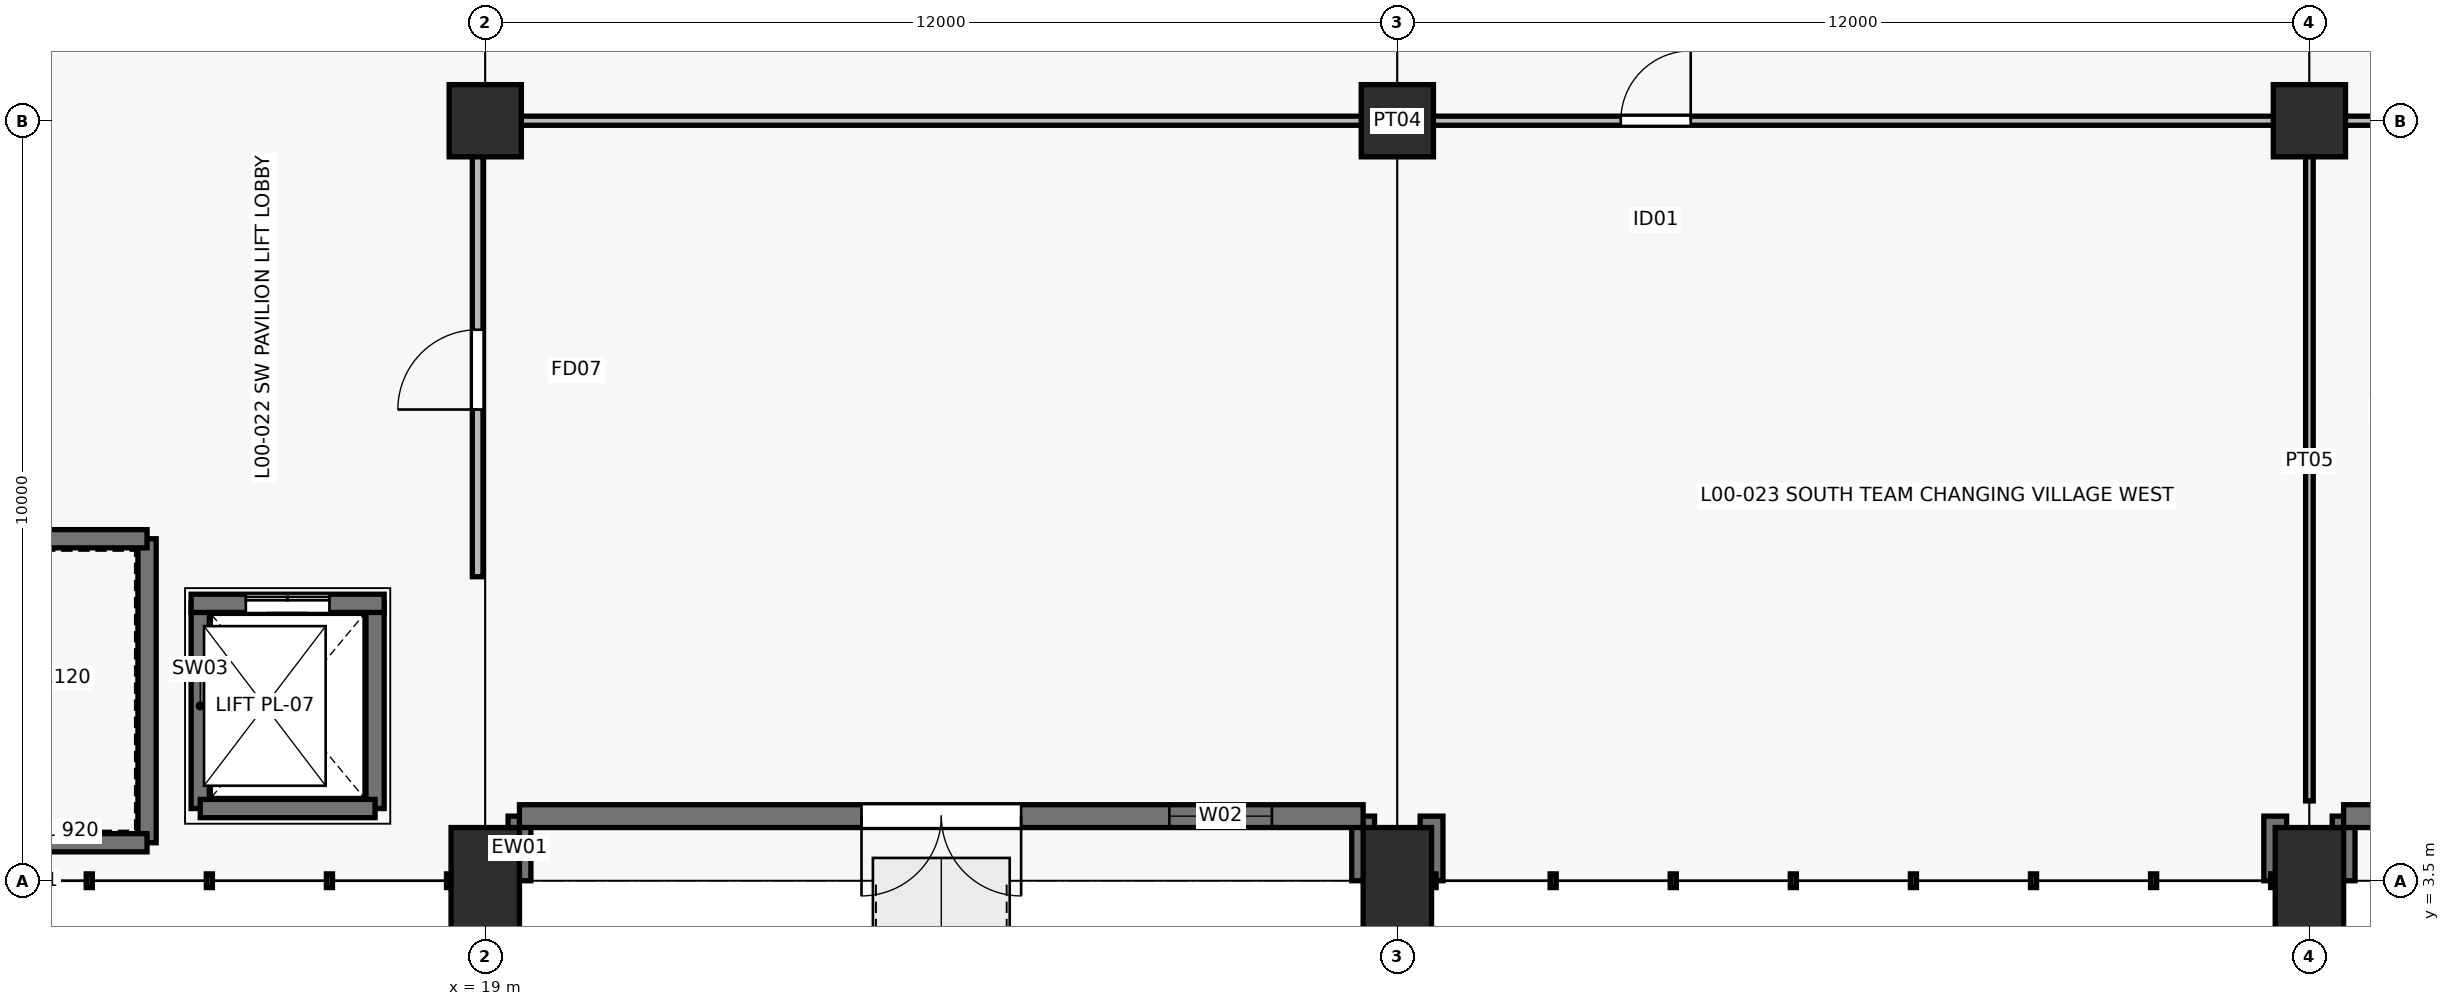
"""IFC4 building model, lengths in metres.
Left out: names, types, materials, properties, quantities, classifications, styles, units other than length and angle.
Written with IfcOpenShell. Run it as: python <this file> out.ifc"""

import sys

from ifc_helpers import new_model, si_unit, direction, frame, frame_2d, origin, origin_2d, place, context, subcontext, project, spatial, rectangle, extrude, element, fill, save


model = new_model("IFC4")
c1 = context("Model", 3, precision=1e-05, world=origin(), true_north=direction((0.0, 1.0)))
c2 = subcontext(c1, "Body", "Model", "MODEL_VIEW")
j1 = project(units=[si_unit("LENGTHUNIT", "METRE"), si_unit("PLANEANGLEUNIT", "RADIAN")], contexts=[c1])
p1 = place(None, origin())
s1 = spatial("IfcSite", under=j1, at=p1, CompositionType="ELEMENT")
p2 = place(p1, origin())
s2 = spatial("IfcBuilding", under=s1, at=p2, CompositionType="ELEMENT")
p3 = place(p2, origin())
s3 = spatial("IfcBuildingStorey", under=s2, at=p3, CompositionType="ELEMENT", Elevation=0.0)
p4 = place(p3, frame((19.0, 3.5, 0.0), z_axis=(0.0, 0.0, 1.0), x_axis=(1.0, 0.0, 0.0)))
e1 = element("IfcColumn", 1, at=p4, inside=s3, PredefinedType="PILASTER", context=c2, shape_type="SweptSolid", body=[
    extrude(rectangle(XDim=0.9, YDim=1.4, at=origin_2d()), origin(), (0.0, 0.0, 1.0), 4.8),
])
p5 = place(p3, frame((19.0, 13.5, 0.0), z_axis=(0.0, 0.0, 1.0), x_axis=(1.0, 0.0, 0.0)))
e2 = element("IfcColumn", 2, at=p5, inside=s3, PredefinedType="COLUMN", context=c2, shape_type="SweptSolid", body=[
    extrude(rectangle(XDim=0.95, YDim=0.95, at=origin_2d()), origin(), (0.0, 0.0, 1.0), 4.8),
])
p6 = place(p3, frame((31.0, 3.5, 0.0), z_axis=(0.0, 0.0, 1.0), x_axis=(1.0, 0.0, 0.0)))
e3 = element("IfcColumn", 3, at=p6, inside=s3, PredefinedType="PILASTER", context=c2, shape_type="SweptSolid", body=[
    extrude(rectangle(XDim=0.9, YDim=1.4, at=origin_2d()), origin(), (0.0, 0.0, 1.0), 4.8),
])
p7 = place(p3, frame((31.0, 13.5, 0.0), z_axis=(0.0, 0.0, 1.0), x_axis=(1.0, 0.0, 0.0)))
e4 = element("IfcColumn", 4, at=p7, inside=s3, PredefinedType="COLUMN", context=c2, shape_type="SweptSolid", body=[
    extrude(rectangle(XDim=0.95, YDim=0.95, at=origin_2d()), origin(), (0.0, 0.0, 1.0), 4.8),
])
p8 = place(p3, frame((43.0, 3.5, 0.0), z_axis=(0.0, 0.0, 1.0), x_axis=(1.0, 0.0, 0.0)))
e5 = element("IfcColumn", 5, at=p8, inside=s3, PredefinedType="PILASTER", context=c2, shape_type="SweptSolid", body=[
    extrude(rectangle(XDim=0.9, YDim=1.4, at=origin_2d()), origin(), (0.0, 0.0, 1.0), 4.8),
])
p9 = place(p3, frame((43.0, 13.5, 0.0), z_axis=(0.0, 0.0, 1.0), x_axis=(1.0, 0.0, 0.0)))
e6 = element("IfcColumn", 6, at=p9, inside=s3, PredefinedType="COLUMN", context=c2, shape_type="SweptSolid", body=[
    extrude(rectangle(XDim=0.95, YDim=0.95, at=origin_2d()), origin(), (0.0, 0.0, 1.0), 4.8),
])
for number, where, z_axis, x_axis in (
    (7, (19.45, 3.5, 0.0), (0.0, 0.0, 1.0), (0.0, 1.0, 0.0)),
    (8, (30.55, 4.35, 0.0), (0.0, 0.0, 1.0), (0.0, -1.0, 0.0)),
):
    element("IfcWall", number, at=place(p3, frame(where, z_axis=z_axis, x_axis=x_axis)), inside=s3, PredefinedType="SOLIDWALL", context=c2, shape_type="SweptSolid", body=[
        extrude(rectangle(XDim=0.85, YDim=0.3, at=frame_2d((0.425, 0.0))), origin(), (0.0, 0.0, 1.0), 4.8),
    ])
p10 = place(p3, frame((30.55, 4.35, 0.0), z_axis=(0.0, 0.0, 1.0), x_axis=(-1.0, 0.0, 0.0)))
e9 = element("IfcWall", 9, at=p10, inside=s3, PredefinedType="SOLIDWALL", context=c2, shape_type="SweptSolid", body=[
    extrude(rectangle(XDim=11.1, YDim=0.3, at=frame_2d((5.55, 0.0))), origin(), (0.0, 0.0, 1.0), 4.8),
])
p11 = place(p10, frame((4.5, 0.0, 0.0)))
e10 = element("IfcOpeningElement", 10, at=p11, cuts=e9, PredefinedType="OPENING", context=c2, shape_type="SweptSolid", body=[
    extrude(rectangle(XDim=2.1, YDim=2.35, at=frame_2d((1.05, 1.175))), frame((0.0, 0.16, 0.0), z_axis=(0.0, -1.0, 0.0), x_axis=(1.0, 0.0, 0.0)), (0.0, 0.0, 1.0), 0.32),
])
p12 = place(p10, frame((1.2, 0.0, 1.0)))
e11 = element("IfcOpeningElement", 11, at=p12, cuts=e9, PredefinedType="OPENING", context=c2, shape_type="SweptSolid", body=[
    extrude(rectangle(XDim=1.35, YDim=1.5, at=frame_2d((0.675, 0.75))), frame((0.0, 0.16, 0.0), z_axis=(0.0, -1.0, 0.0), x_axis=(1.0, 0.0, 0.0)), (0.0, 0.0, 1.0), 0.32),
])
for number, where, z_axis, x_axis in (
    (12, (31.45, 3.5, 0.0), (0.0, 0.0, 1.0), (0.0, 1.0, 0.0)),
    (13, (42.55, 4.35, 0.0), (0.0, 0.0, 1.0), (0.0, -1.0, 0.0)),
    (14, (43.45, 3.5, 0.0), (0.0, 0.0, 1.0), (0.0, 1.0, 0.0)),
):
    element("IfcWall", number, at=place(p3, frame(where, z_axis=z_axis, x_axis=x_axis)), inside=s3, PredefinedType="SOLIDWALL", context=c2, shape_type="SweptSolid", body=[
        extrude(rectangle(XDim=0.85, YDim=0.3, at=frame_2d((0.425, 0.0))), origin(), (0.0, 0.0, 1.0), 4.8),
    ])
p13 = place(p3, frame((54.55, 4.35, 0.0), z_axis=(0.0, 0.0, 1.0), x_axis=(-1.0, 0.0, 0.0)))
e15 = element("IfcWall", 15, at=p13, inside=s3, PredefinedType="SOLIDWALL", context=c2, shape_type="SweptSolid", body=[
    extrude(rectangle(XDim=11.1, YDim=0.3, at=frame_2d((5.55, 0.0))), origin(), (0.0, 0.0, 1.0), 4.8),
])
p14 = place(p13, frame((1.8, 0.0, 0.0)))
e16 = element("IfcOpeningElement", 16, at=p14, cuts=e15, PredefinedType="OPENING", context=c2, shape_type="SweptSolid", body=[
    extrude(rectangle(XDim=2.8, YDim=2.7, at=frame_2d((1.4, 1.35))), frame((0.0, 0.16, 0.0), z_axis=(0.0, -1.0, 0.0), x_axis=(1.0, 0.0, 0.0)), (0.0, 0.0, 1.0), 0.32),
])
p15 = place(p3, frame((15.25, 4.45, -1.3), z_axis=(0.0, 0.0, 1.0), x_axis=(0.0, 1.0, 0.0)))
e17 = element("IfcWall", 17, at=p15, inside=s3, PredefinedType="SHEAR", context=c2, shape_type="SweptSolid", body=[
    extrude(rectangle(XDim=2.7, YDim=0.24, at=frame_2d((1.35, 0.0))), origin(), (0.0, 0.0, 1.0), 6.1),
])
p16 = place(p3, frame((17.55, 7.15, 0.0), z_axis=(0.0, 0.0, 1.0), x_axis=(0.0, -1.0, 0.0)))
e18 = element("IfcWall", 18, at=p16, inside=s3, PredefinedType="SHEAR", context=c2, shape_type="SweptSolid", body=[
    extrude(rectangle(XDim=2.7, YDim=0.24, at=frame_2d((1.35, 0.0))), origin(), (0.0, 0.0, 1.0), 4.8),
])
p17 = place(p3, frame((17.55, 4.45, 0.0), z_axis=(0.0, 0.0, 1.0), x_axis=(-1.0, 0.0, 0.0)))
e19 = element("IfcWall", 19, at=p17, inside=s3, PredefinedType="SHEAR", context=c2, shape_type="SweptSolid", body=[
    extrude(rectangle(XDim=2.3, YDim=0.24, at=frame_2d((1.15, 0.0))), origin(), (0.0, 0.0, 1.0), 4.8),
])
p18 = place(p3, frame((15.13, 7.15, 0.0), z_axis=(0.0, 0.0, 1.0), x_axis=(1.0, 0.0, 0.0)))
e20 = element("IfcWall", 20, at=p18, inside=s3, PredefinedType="SHEAR", context=c2, shape_type="SweptSolid", body=[
    extrude(rectangle(XDim=2.54, YDim=0.24, at=frame_2d((1.27, 0.0))), origin(), (0.0, 0.0, 1.0), 4.8),
])
p19 = place(p18, frame((0.72, 0.0, 0.0)))
e21 = element("IfcOpeningElement", 21, at=p19, cuts=e20, PredefinedType="OPENING", context=c2, shape_type="SweptSolid", body=[
    extrude(rectangle(XDim=1.1, YDim=2.15, at=frame_2d((0.55, 1.075))), frame((0.0, 0.13, 0.0), z_axis=(0.0, -1.0, 0.0), x_axis=(1.0, 0.0, 0.0)), (0.0, 0.0, 1.0), 0.26),
])
p20 = place(p3, frame((14.55, 4.0, 0.0), z_axis=(0.0, 0.0, 1.0), x_axis=(0.0, 1.0, 0.0)))
e22 = element("IfcWall", 22, at=p20, inside=s3, PredefinedType="SHEAR", context=c2, shape_type="SweptSolid", body=[
    extrude(rectangle(XDim=4.0, YDim=0.24, at=frame_2d((2.0, 0.0))), origin(), (0.0, 0.0, 1.0), 4.8),
])
p21 = place(p3, frame((7.45, 4.0, 0.0), z_axis=(0.0, 0.0, 1.0), x_axis=(1.0, 0.0, 0.0)))
e23 = element("IfcWall", 23, at=p21, inside=s3, PredefinedType="SHEAR", context=c2, shape_type="SweptSolid", body=[
    extrude(rectangle(XDim=7.1, YDim=0.24, at=frame_2d((3.55, 0.0))), origin(), (0.0, 0.0, 1.0), 4.8),
])
p22 = place(p3, frame((7.45, 8.0, 0.0), z_axis=(0.0, 0.0, 1.0), x_axis=(1.0, 0.0, 0.0)))
e24 = element("IfcWall", 24, at=p22, inside=s3, PredefinedType="SHEAR", context=c2, shape_type="SweptSolid", body=[
    extrude(rectangle(XDim=7.1, YDim=0.24, at=frame_2d((3.55, 0.0))), origin(), (0.0, 0.0, 1.0), 4.8),
])
p23 = place(p22, frame((0.18, 0.0, 0.0)))
e25 = element("IfcOpeningElement", 25, at=p23, cuts=e24, PredefinedType="OPENING", context=c2, shape_type="SweptSolid", body=[
    extrude(rectangle(XDim=1.0, YDim=2.15, at=frame_2d((0.5, 1.075))), frame((0.0, 0.13, 0.0), z_axis=(0.0, -1.0, 0.0), x_axis=(1.0, 0.0, 0.0)), (0.0, 0.0, 1.0), 0.26),
])
p24 = place(p3, frame((18.9, 7.5, 0.0), z_axis=(0.0, 0.0, 1.0), x_axis=(0.0, 1.0, 0.0)))
e26 = element("IfcWall", 26, at=p24, inside=s3, PredefinedType="PARTITIONING", context=c2, shape_type="SweptSolid", body=[
    extrude(rectangle(XDim=5.9, YDim=0.14, at=frame_2d((2.95, 0.0))), origin(), (0.0, 0.0, 1.0), 3.645),
])
p25 = place(p24, frame((2.2, 0.0, 0.0)))
e27 = element("IfcOpeningElement", 27, at=p25, cuts=e26, PredefinedType="OPENING", context=c2, shape_type="SweptSolid", body=[
    extrude(rectangle(XDim=1.05, YDim=2.1, at=frame_2d((0.525, 1.05))), frame((0.0, 0.08, 0.0), z_axis=(0.0, -1.0, 0.0), x_axis=(1.0, 0.0, 0.0)), (0.0, 0.0, 1.0), 0.16),
])
p26 = place(p3, frame((19.45, 13.5, 0.0), z_axis=(0.0, 0.0, 1.0), x_axis=(1.0, 0.0, 0.0)))
e28 = element("IfcWall", 28, at=p26, inside=s3, PredefinedType="PARTITIONING", context=c2, shape_type="SweptSolid", body=[
    extrude(rectangle(XDim=23.1, YDim=0.12, at=frame_2d((11.55, 0.0))), origin(), (0.0, 0.0, 1.0), 3.645),
])
p27 = place(p26, frame((14.49, 0.0, 0.0)))
e29 = element("IfcOpeningElement", 29, at=p27, cuts=e28, PredefinedType="OPENING", context=c2, shape_type="SweptSolid", body=[
    extrude(rectangle(XDim=0.92, YDim=2.1, at=frame_2d((0.46, 1.05))), frame((0.0, 0.07, 0.0), z_axis=(0.0, -1.0, 0.0), x_axis=(1.0, 0.0, 0.0)), (0.0, 0.0, 1.0), 0.14),
])
p28 = place(p3, frame((43.45, 13.5, 0.0), z_axis=(0.0, 0.0, 1.0), x_axis=(1.0, 0.0, 0.0)))
e30 = element("IfcWall", 30, at=p28, inside=s3, PredefinedType="PARTITIONING", context=c2, shape_type="SweptSolid", body=[
    extrude(rectangle(XDim=5.65, YDim=0.12, at=frame_2d((2.825, 0.0))), origin(), (0.0, 0.0, 1.0), 3.645),
])
p29 = place(p28, frame((2.365, 0.0, 0.0)))
e31 = element("IfcOpeningElement", 31, at=p29, cuts=e30, PredefinedType="OPENING", context=c2, shape_type="SweptSolid", body=[
    extrude(rectangle(XDim=0.92, YDim=2.1, at=frame_2d((0.46, 1.05))), frame((0.0, 0.07, 0.0), z_axis=(0.0, -1.0, 0.0), x_axis=(1.0, 0.0, 0.0)), (0.0, 0.0, 1.0), 0.14),
])
p30 = place(p3, frame((43.0, 4.55, 0.0), z_axis=(0.0, 0.0, 1.0), x_axis=(0.0, 1.0, 0.0)))
e32 = element("IfcWall", 32, at=p30, inside=s3, PredefinedType="PARTITIONING", context=c2, shape_type="SweptSolid", body=[
    extrude(rectangle(XDim=8.95, YDim=0.1, at=frame_2d((4.475, 0.0))), origin(), (0.0, 0.0, 1.0), 3.645),
])
p31 = place(p11, origin())
e33 = element("IfcDoor", 33, at=p31, inside=s3, OperationType="DOUBLE_DOOR_SINGLE_SWING", PredefinedType="DOOR", context=c2, shape_type="SweptSolid", body=[
    extrude(rectangle(XDim=2.1, YDim=2.35, at=frame_2d((1.05, 1.175))), frame((0.0, 0.025, 0.0), z_axis=(0.0, -1.0, 0.0), x_axis=(1.0, 0.0, 0.0)), (0.0, 0.0, 1.0), 0.05),
])
fill(e10, e33)
p32 = place(p12, origin())
e34 = element("IfcWindow", 34, at=p32, inside=s3, PartitioningType="SINGLE_PANEL", PredefinedType="WINDOW", context=c2, shape_type="SweptSolid", body=[
    extrude(rectangle(XDim=1.35, YDim=1.5, at=frame_2d((0.675, 0.75))), frame((0.0, 0.03, 0.0), z_axis=(0.0, -1.0, 0.0), x_axis=(1.0, 0.0, 0.0)), (0.0, 0.0, 1.0), 0.06),
])
fill(e11, e34)
p33 = place(p19, origin())
e35 = element("IfcDoor", 35, at=p33, inside=s3, OperationType="DOUBLE_DOOR_SLIDING", PredefinedType="USERDEFINED", context=c2, shape_type="SweptSolid", body=[
    extrude(rectangle(XDim=1.1, YDim=2.15, at=frame_2d((0.55, 1.075))), frame((0.0, 0.025, 0.0), z_axis=(0.0, -1.0, 0.0), x_axis=(1.0, 0.0, 0.0)), (0.0, 0.0, 1.0), 0.05),
])
fill(e21, e35)
p34 = place(p25, origin())
e36 = element("IfcDoor", 36, at=p34, inside=s3, OperationType="SINGLE_SWING_LEFT", PredefinedType="DOOR", context=c2, shape_type="SweptSolid", body=[
    extrude(rectangle(XDim=1.05, YDim=2.1, at=frame_2d((0.525, 1.05))), frame((0.0, 0.025, 0.0), z_axis=(0.0, -1.0, 0.0), x_axis=(1.0, 0.0, 0.0)), (0.0, 0.0, 1.0), 0.05),
])
fill(e27, e36)
p35 = place(p27, origin())
e37 = element("IfcDoor", 37, at=p35, inside=s3, OperationType="SINGLE_SWING_RIGHT", PredefinedType="DOOR", context=c2, shape_type="SweptSolid", body=[
    extrude(rectangle(XDim=0.92, YDim=2.1, at=frame_2d((0.46, 1.05))), frame((0.0, 0.025, 0.0), z_axis=(0.0, -1.0, 0.0), x_axis=(1.0, 0.0, 0.0)), (0.0, 0.0, 1.0), 0.05),
])
fill(e29, e37)
save(model, sys.argv[1])
